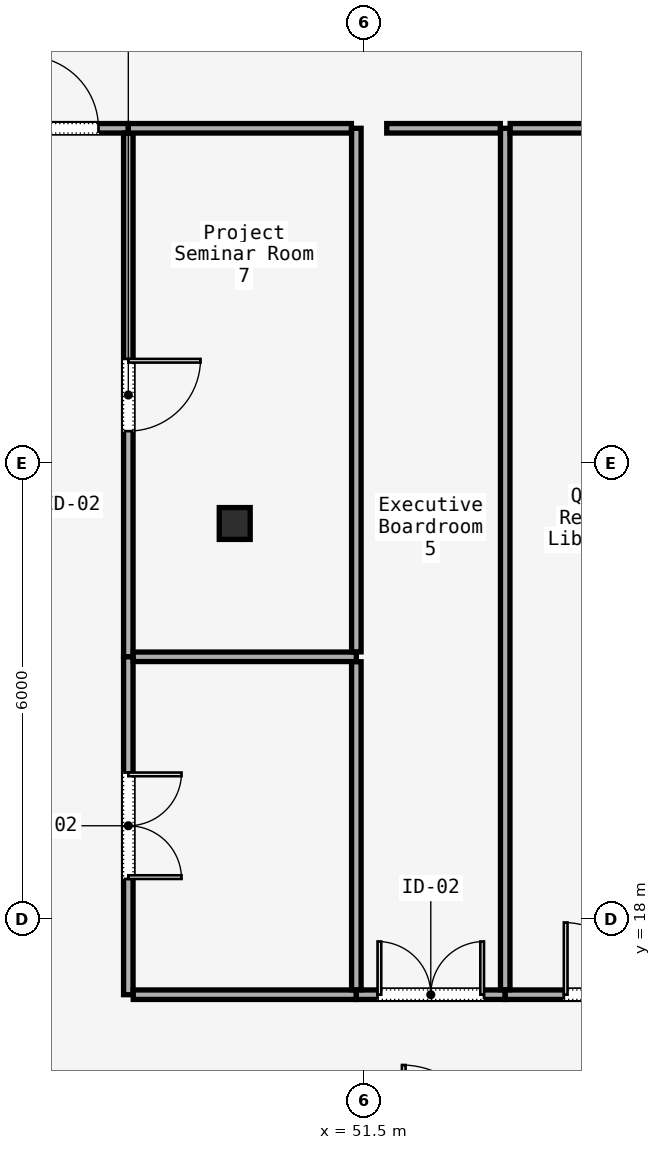
"""IFC4 building model, lengths in metres.
Left out: names, types, materials, properties, quantities, classifications, styles, units other than length and angle.
Written with IfcOpenShell. Run it as: python <this file> out.ifc"""

import sys

from ifc_helpers import new_model, si_unit, direction, frame, frame_2d, origin, origin_2d, place, context, subcontext, project, spatial, rectangle, i_section, extrude, element, fill, save


model = new_model("IFC4")
c1 = context("Model", 3, precision=1e-05, world=origin(), true_north=direction((0.0, 1.0)))
c2 = subcontext(c1, "Body", "Model", "MODEL_VIEW")
j1 = project(units=[si_unit("LENGTHUNIT", "METRE"), si_unit("PLANEANGLEUNIT", "RADIAN")], contexts=[c1])
p1 = place(None, origin())
s1 = spatial("IfcSite", under=j1, at=p1, CompositionType="ELEMENT")
p2 = place(p1, origin())
s2 = spatial("IfcBuilding", under=s1, at=p2, CompositionType="ELEMENT")
p3 = place(p2, frame((0.0, 0.0, 142.2)))
s3 = spatial("IfcBuildingStorey", under=s2, at=p3, CompositionType="ELEMENT", Elevation=142.2)
p4 = place(p3, frame((49.8, 23.2, 0.0), z_axis=(0.0, 0.0, 1.0), x_axis=(1.0, 0.0, 0.0)))
e1 = element("IfcColumn", 1, at=p4, inside=s3, PredefinedType="COLUMN", context=c2, shape_type="SweptSolid", body=[
    extrude(i_section(OverallWidth=0.407, OverallDepth=0.419, WebThickness=0.031, FlangeThickness=0.049, FilletRadius=0.015, at=origin_2d()), origin(), (0.0, 0.0, 1.0), 3.58),
])
p5 = place(p3, frame((46.665, 28.4, 0.0), z_axis=(0.0, 0.0, 1.0), x_axis=(1.0, 0.0, 0.0)))
e2 = element("IfcWall", 2, at=p5, inside=s3, PredefinedType="PARTITIONING", context=c2, shape_type="SweptSolid", body=[
    extrude(rectangle(XDim=1.735, YDim=0.125, at=frame_2d((0.867, 0.0))), origin(), (0.0, 0.0, 1.0), 3.01),
])
p6 = place(p5, frame((0.393, 0.0, 0.0)))
e3 = element("IfcOpeningElement", 3, at=p6, cuts=e2, PredefinedType="OPENING", context=c2, shape_type="SweptSolid", body=[
    extrude(rectangle(XDim=0.95, YDim=2.2, at=frame_2d((0.475, 1.1))), frame((0.0, 0.062, 0.0), z_axis=(0.0, -1.0, 0.0), x_axis=(1.0, 0.0, 0.0)), (0.0, 0.0, 1.0), 0.125),
])
p7 = place(p3, frame((48.4, 28.335, 0.0), z_axis=(0.0, 0.0, 1.0), x_axis=(0.0, -1.0, 0.0)))
e4 = element("IfcWall", 4, at=p7, inside=s3, PredefinedType="PARTITIONING", context=c2, shape_type="SweptSolid", body=[
    extrude(rectangle(XDim=6.889, YDim=0.125, at=frame_2d((3.444, 0.0))), origin(), (0.0, 0.0, 1.0), 3.01),
])
p8 = place(p7, frame((2.969, 0.0, 0.0)))
e5 = element("IfcOpeningElement", 5, at=p8, cuts=e4, PredefinedType="OPENING", context=c2, shape_type="SweptSolid", body=[
    extrude(rectangle(XDim=0.95, YDim=2.2, at=frame_2d((0.475, 1.1))), frame((0.0, 0.062, 0.0), z_axis=(0.0, -1.0, 0.0), x_axis=(1.0, 0.0, 0.0)), (0.0, 0.0, 1.0), 0.125),
])
p9 = place(p3, frame((48.4, 21.446, 0.0), z_axis=(0.0, 0.0, 1.0), x_axis=(0.0, -1.0, 0.0)))
e6 = element("IfcWall", 6, at=p9, inside=s3, PredefinedType="PARTITIONING", context=c2, shape_type="SweptSolid", body=[
    extrude(rectangle(XDim=4.446, YDim=0.125, at=frame_2d((2.223, 0.0))), origin(), (0.0, 0.0, 1.0), 3.01),
])
p10 = place(p9, frame((1.523, 0.0, 0.0)))
e7 = element("IfcOpeningElement", 7, at=p10, cuts=e6, PredefinedType="OPENING", context=c2, shape_type="SweptSolid", body=[
    extrude(rectangle(XDim=1.4, YDim=2.2, at=frame_2d((0.7, 1.1))), frame((0.0, 0.062, 0.0), z_axis=(0.0, -1.0, 0.0), x_axis=(1.0, 0.0, 0.0)), (0.0, 0.0, 1.0), 0.125),
])
p11 = place(p3, frame((48.465, 17.0, 0.0), z_axis=(0.0, 0.0, 1.0), x_axis=(1.0, 0.0, 0.0)))
e8 = element("IfcWall", 8, at=p11, inside=s3, PredefinedType="PARTITIONING", context=c2, shape_type="SweptSolid", body=[
    extrude(rectangle(XDim=2.935, YDim=0.125, at=frame_2d((1.467, 0.0))), origin(), (0.0, 0.0, 1.0), 3.01),
])
p12 = place(p3, frame((51.4, 17.0, 0.0), z_axis=(0.0, 0.0, 1.0), x_axis=(1.0, 0.0, 0.0)))
e9 = element("IfcWall", 9, at=p12, inside=s3, PredefinedType="PARTITIONING", context=c2, shape_type="SweptSolid", body=[
    extrude(rectangle(XDim=1.959, YDim=0.125, at=frame_2d((0.979, 0.0))), origin(), (0.0, 0.0, 1.0), 3.01),
])
p13 = place(p12, frame((0.279, 0.0, 0.0)))
e10 = element("IfcOpeningElement", 10, at=p13, cuts=e9, PredefinedType="OPENING", context=c2, shape_type="SweptSolid", body=[
    extrude(rectangle(XDim=1.4, YDim=2.2, at=frame_2d((0.7, 1.1))), frame((0.0, 0.062, 0.0), z_axis=(0.0, -1.0, 0.0), x_axis=(1.0, 0.0, 0.0)), (0.0, 0.0, 1.0), 0.125),
])
p14 = place(p3, frame((53.359, 17.0, 0.0), z_axis=(0.0, 0.0, 1.0), x_axis=(1.0, 0.0, 0.0)))
e11 = element("IfcWall", 11, at=p14, inside=s3, PredefinedType="PARTITIONING", context=c2, shape_type="SweptSolid", body=[
    extrude(rectangle(XDim=2.493, YDim=0.125, at=frame_2d((1.247, 0.0))), origin(), (0.0, 0.0, 1.0), 3.01),
])
p15 = place(p14, frame((0.771, 0.0, 0.0)))
e12 = element("IfcOpeningElement", 12, at=p15, cuts=e11, PredefinedType="OPENING", context=c2, shape_type="SweptSolid", body=[
    extrude(rectangle(XDim=0.95, YDim=2.2, at=frame_2d((0.475, 1.1))), frame((0.0, 0.062, 0.0), z_axis=(0.0, -1.0, 0.0), x_axis=(1.0, 0.0, 0.0)), (0.0, 0.0, 1.0), 0.125),
])
p16 = place(p3, frame((48.465, 21.446, 0.0), z_axis=(0.0, 0.0, 1.0), x_axis=(1.0, 0.0, 0.0)))
e13 = element("IfcWall", 13, at=p16, inside=s3, PredefinedType="PARTITIONING", context=c2, shape_type="SweptSolid", body=[
    extrude(rectangle(XDim=2.935, YDim=0.125, at=frame_2d((1.467, 0.0))), origin(), (0.0, 0.0, 1.0), 3.01),
])
p17 = place(p3, frame((51.4, 21.381, 0.0), z_axis=(0.0, 0.0, 1.0), x_axis=(0.0, -1.0, 0.0)))
e14 = element("IfcWall", 14, at=p17, inside=s3, PredefinedType="PARTITIONING", context=c2, shape_type="SweptSolid", body=[
    extrude(rectangle(XDim=4.316, YDim=0.125, at=frame_2d((2.158, 0.0))), origin(), (0.0, 0.0, 1.0), 3.01),
])
p18 = place(p3, frame((53.359, 28.4, 0.0), z_axis=(0.0, 0.0, 1.0), x_axis=(0.0, -1.0, 0.0)))
e15 = element("IfcWall", 15, at=p18, inside=s3, PredefinedType="PARTITIONING", context=c2, shape_type="SweptSolid", body=[
    extrude(rectangle(XDim=11.335, YDim=0.125, at=frame_2d((5.667, 0.0))), origin(), (0.0, 0.0, 1.0), 3.01),
])
p19 = place(p3, frame((51.4, 21.511, 0.0), z_axis=(0.0, 0.0, 1.0), x_axis=(0.0, 1.0, 0.0)))
e16 = element("IfcWall", 16, at=p19, inside=s3, PredefinedType="PARTITIONING", context=c2, shape_type="SweptSolid", body=[
    extrude(rectangle(XDim=6.889, YDim=0.125, at=frame_2d((3.444, 0.0))), origin(), (0.0, 0.0, 1.0), 3.01),
])
p20 = place(p3, frame((51.8, 28.4, 0.0), z_axis=(0.0, 0.0, 1.0), x_axis=(1.0, 0.0, 0.0)))
e17 = element("IfcWall", 17, at=p20, inside=s3, PredefinedType="PARTITIONING", context=c2, shape_type="SweptSolid", body=[
    extrude(rectangle(XDim=1.494, YDim=0.125, at=frame_2d((0.747, 0.0))), origin(), (0.0, 0.0, 1.0), 3.01),
])
p21 = place(p3, frame((53.424, 28.4, 0.0), z_axis=(0.0, 0.0, 1.0), x_axis=(1.0, 0.0, 0.0)))
e18 = element("IfcWall", 18, at=p21, inside=s3, PredefinedType="PARTITIONING", context=c2, shape_type="SweptSolid", body=[
    extrude(rectangle(XDim=2.363, YDim=0.125, at=frame_2d((1.182, 0.0))), origin(), (0.0, 0.0, 1.0), 3.01),
])
p22 = place(p3, frame((48.4, 28.4, 0.0), z_axis=(0.0, 0.0, 1.0), x_axis=(1.0, 0.0, 0.0)))
e19 = element("IfcWall", 19, at=p22, inside=s3, PredefinedType="PARTITIONING", context=c2, shape_type="SweptSolid", body=[
    extrude(rectangle(XDim=2.935, YDim=0.125, at=frame_2d((1.468, 0.0))), origin(), (0.0, 0.0, 1.0), 3.01),
])
p23 = place(p10, origin())
e20 = element("IfcDoor", 20, at=p23, inside=s3, OperationType="SINGLE_SWING_LEFT", PredefinedType="DOOR", context=c2, shape_type="SweptSolid", body=[
    extrude(rectangle(XDim=1.4, YDim=2.2, at=frame_2d((0.7, 1.1))), frame((0.0, 0.025, 0.0), z_axis=(0.0, -1.0, 0.0), x_axis=(1.0, 0.0, 0.0)), (0.0, 0.0, 1.0), 0.05),
])
fill(e7, e20)
p24 = place(p13, origin())
e21 = element("IfcDoor", 21, at=p24, inside=s3, OperationType="SINGLE_SWING_RIGHT", PredefinedType="DOOR", context=c2, shape_type="SweptSolid", body=[
    extrude(rectangle(XDim=1.4, YDim=2.2, at=frame_2d((0.7, 1.1))), frame((0.0, 0.025, 0.0), z_axis=(0.0, -1.0, 0.0), x_axis=(1.0, 0.0, 0.0)), (0.0, 0.0, 1.0), 0.05),
])
fill(e10, e21)
p25 = place(p15, origin())
e22 = element("IfcDoor", 22, at=p25, inside=s3, OperationType="SINGLE_SWING_LEFT", PredefinedType="DOOR", context=c2, shape_type="SweptSolid", body=[
    extrude(rectangle(XDim=0.95, YDim=2.2, at=frame_2d((0.475, 1.1))), frame((0.0, 0.025, 0.0), z_axis=(0.0, -1.0, 0.0), x_axis=(1.0, 0.0, 0.0)), (0.0, 0.0, 1.0), 0.05),
])
fill(e12, e22)
p26 = place(p8, origin())
e23 = element("IfcDoor", 23, at=p26, inside=s3, OperationType="SINGLE_SWING_LEFT", PredefinedType="DOOR", context=c2, shape_type="SweptSolid", body=[
    extrude(rectangle(XDim=0.95, YDim=2.2, at=frame_2d((0.475, 1.1))), frame((0.0, 0.025, 0.0), z_axis=(0.0, -1.0, 0.0), x_axis=(1.0, 0.0, 0.0)), (0.0, 0.0, 1.0), 0.05),
])
fill(e5, e23)
p27 = place(p6, origin())
e24 = element("IfcDoor", 24, at=p27, inside=s3, OperationType="SINGLE_SWING_RIGHT", PredefinedType="DOOR", context=c2, shape_type="SweptSolid", body=[
    extrude(rectangle(XDim=0.95, YDim=2.2, at=frame_2d((0.475, 1.1))), frame((0.0, 0.025, 0.0), z_axis=(0.0, -1.0, 0.0), x_axis=(1.0, 0.0, 0.0)), (0.0, 0.0, 1.0), 0.05),
])
fill(e3, e24)
save(model, sys.argv[1])
